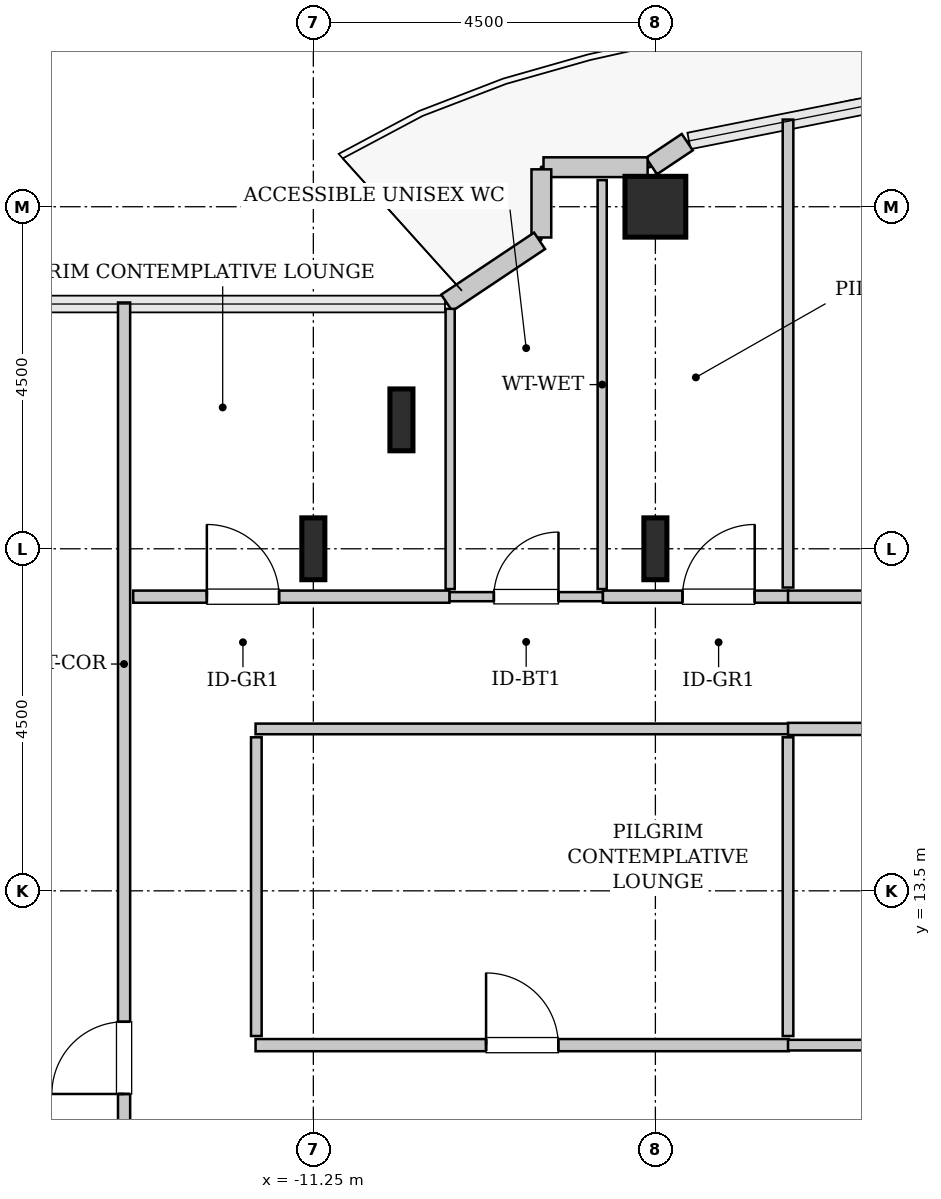
"""IFC4 building model, lengths in metres.
Left out: names, types, materials, properties, quantities, classifications, styles, units other than length and angle.
Written with IfcOpenShell. Run it as: python <this file> out.ifc"""

import sys

from ifc_helpers import new_model, si_unit, direction, frame, frame_2d, origin, origin_2d, place, context, subcontext, project, spatial, rectangle, hollow_rectangle, i_section, extrude, source, transform, mapped, element, fill, save


model = new_model("IFC4")
c1 = context("Model", 3, precision=1e-05, world=origin(), true_north=direction((0.0, 1.0)))
c2 = subcontext(c1, "Body", "Model", "MODEL_VIEW")
j1 = project(units=[si_unit("LENGTHUNIT", "METRE"), si_unit("PLANEANGLEUNIT", "RADIAN")], contexts=[c1])
p1 = place(None, origin())
s1 = spatial("IfcSite", under=j1, at=p1, CompositionType="ELEMENT")
p2 = place(p1, origin())
s2 = spatial("IfcBuilding", under=s1, at=p2, CompositionType="ELEMENT")
p3 = place(p2, frame((0.0, 0.0, 148.8)))
s3 = spatial("IfcBuildingStorey", under=s2, at=p3, CompositionType="ELEMENT", Elevation=148.8)
m1 = source(origin(), c2, "Body", "SweptSolid", [
    extrude(i_section(OverallWidth=0.303, OverallDepth=0.814, WebThickness=0.021, FlangeThickness=0.04, FilletRadius=0.03, at=origin_2d()), origin(), (0.0, 0.0, 1.0), 3.8),
])
for number, where, z_axis, x_axis in (
    (1, (-11.25, 18.0, 0.0), (0.0, 0.0, 1.0), (1.0, 0.0, 0.0)),
    (2, (-10.091, 19.696, 0.0), (0.0, 0.0, 1.0), (1.0, 0.0, 0.0)),
    (3, (-6.75, 18.0, 0.0), (0.0, 0.0, 1.0), (1.0, 0.0, 0.0)),
):
    element("IfcColumn", number, at=place(p3, frame(where, z_axis=z_axis, x_axis=x_axis)), inside=s3, PredefinedType="COLUMN", context=c2, shape_type="MappedRepresentation", body=[
        mapped(m1, transform((0.0, 0.0, 0.0), x_axis=(1.0, 0.0, 0.0), y_axis=(0.0, 1.0, 0.0), z_axis=(0.0, 0.0, 1.0), scale=1.0)),
    ])
m2 = source(origin(), c2, "Body", "SweptSolid", [
    extrude(hollow_rectangle(XDim=0.8, YDim=0.8, WallThickness=0.04, InnerFilletRadius=0.04, OuterFilletRadius=0.08, at=origin_2d()), origin(), (0.0, 0.0, 1.0), 3.8),
])
p4 = place(p3, frame((-6.75, 22.5, 0.0), z_axis=(0.0, 0.0, 1.0), x_axis=(1.0, 0.0, 0.0)))
e4 = element("IfcColumn", 4, at=p4, inside=s3, PredefinedType="COLUMN", context=c2, shape_type="MappedRepresentation", body=[
    mapped(m2, transform((0.0, 0.0, 0.0), x_axis=(1.0, 0.0, 0.0), y_axis=(0.0, 1.0, 0.0), z_axis=(0.0, 0.0, 1.0), scale=1.0)),
])
m3 = source(origin(), c2, "Body", "SweptSolid", [
    extrude(rectangle(XDim=0.565, YDim=0.26, at=frame_2d((0.283, 0.0))), origin(), (0.0, 0.0, 1.0), 3.55),
])
p5 = place(p3, frame((-6.331, 23.35, 0.0), z_axis=(0.0, 0.0, 1.0), x_axis=(-0.831651492666, -0.555297933317, 0.0)))
e5 = element("IfcWall", 5, at=p5, inside=s3, PredefinedType="SOLIDWALL", context=c2, shape_type="MappedRepresentation", body=[
    mapped(m3, transform((0.0, 0.0, 0.0), x_axis=(1.0, 0.0, 0.0), y_axis=(0.0, 1.0, 0.0), z_axis=(0.0, 0.0, 1.0), scale=1.0)),
])
m4 = source(origin(), c2, "Body", "SweptSolid", [
    extrude(rectangle(XDim=1.37, YDim=0.26, at=frame_2d((0.685, 0.0))), origin(), (0.0, 0.0, 1.0), 3.55),
])
p6 = place(p3, frame((-6.852, 23.02, 0.0), z_axis=(0.0, 0.0, 1.0), x_axis=(-1.0, 0.0, 0.0)))
e6 = element("IfcWall", 6, at=p6, inside=s3, PredefinedType="SOLIDWALL", context=c2, shape_type="MappedRepresentation", body=[
    mapped(m4, transform((0.0, 0.0, 0.0), x_axis=(1.0, 0.0, 0.0), y_axis=(0.0, 1.0, 0.0), z_axis=(0.0, 0.0, 1.0), scale=1.0)),
])
m5 = source(origin(), c2, "Body", "SweptSolid", [
    extrude(rectangle(XDim=0.897, YDim=0.26, at=frame_2d((0.448, 0.0))), origin(), (0.0, 0.0, 1.0), 3.55),
])
p7 = place(p3, frame((-8.25, 22.992, 0.0), z_axis=(0.0, 0.0, 1.0), x_axis=(0.0, -1.0, 0.0)))
e7 = element("IfcWall", 7, at=p7, inside=s3, PredefinedType="SOLIDWALL", context=c2, shape_type="MappedRepresentation", body=[
    mapped(m5, transform((0.0, 0.0, 0.0), x_axis=(1.0, 0.0, 0.0), y_axis=(0.0, 1.0, 0.0), z_axis=(0.0, 0.0, 1.0), scale=1.0)),
])
m6 = source(origin(), c2, "Body", "SweptSolid", [
    extrude(rectangle(XDim=1.469, YDim=0.26, at=frame_2d((0.734, 0.0))), origin(), (0.0, 0.0, 1.0), 3.55),
])
p8 = place(p3, frame((-8.273, 22.052, 0.0), z_axis=(0.0, 0.0, 1.0), x_axis=(-0.831461760506, -0.555581983884, 0.0)))
e8 = element("IfcWall", 8, at=p8, inside=s3, PredefinedType="SOLIDWALL", context=c2, shape_type="MappedRepresentation", body=[
    mapped(m6, transform((0.0, 0.0, 0.0), x_axis=(1.0, 0.0, 0.0), y_axis=(0.0, 1.0, 0.0), z_axis=(0.0, 0.0, 1.0), scale=1.0)),
])
m7 = source(origin(), c2, "Body", "SweptSolid", [
    extrude(rectangle(XDim=2.02, YDim=0.12, at=frame_2d((1.01, 0.0))), origin(), (0.0, 0.0, 1.0), 3.535),
])
p9 = place(p3, frame((-9.46, 17.37, 0.0), z_axis=(0.0, 0.0, 1.0), x_axis=(1.0, 0.0, 0.0)))
e9 = element("IfcWall", 9, at=p9, inside=s3, PredefinedType="PLUMBINGWALL", context=c2, shape_type="MappedRepresentation", body=[
    mapped(m7, transform((0.0, 0.0, 0.0), x_axis=(1.0, 0.0, 0.0), y_axis=(0.0, 1.0, 0.0), z_axis=(0.0, 0.0, 1.0), scale=1.0)),
])
p10 = place(p9, frame((0.585, 0.0, 0.0)))
e10 = element("IfcOpeningElement", 10, at=p10, cuts=e9, PredefinedType="OPENING", context=c2, shape_type="SweptSolid", body=[
    extrude(rectangle(XDim=0.85, YDim=2.1, at=frame_2d((0.425, 1.05))), frame((0.0, 0.07, 0.0), z_axis=(0.0, -1.0, 0.0), x_axis=(1.0, 0.0, 0.0)), (0.0, 0.0, 1.0), 0.14),
])
m8 = source(origin(), c2, "Body", "SweptSolid", [
    extrude(rectangle(XDim=5.38, YDim=0.12, at=frame_2d((2.69, 0.0))), origin(), (0.0, 0.0, 1.0), 3.535),
])
p11 = place(p3, frame((-7.45, 17.47, 0.0), z_axis=(0.0, 0.0, 1.0), x_axis=(0.0, 1.0, 0.0)))
e11 = element("IfcWall", 11, at=p11, inside=s3, PredefinedType="PLUMBINGWALL", context=c2, shape_type="MappedRepresentation", body=[
    mapped(m8, transform((0.0, 0.0, 0.0), x_axis=(1.0, 0.0, 0.0), y_axis=(0.0, 1.0, 0.0), z_axis=(0.0, 0.0, 1.0), scale=1.0)),
])
m9 = source(origin(), c2, "Body", "SweptSolid", [
    extrude(rectangle(XDim=3.687, YDim=0.12, at=frame_2d((1.843, 0.0))), origin(), (0.0, 0.0, 1.0), 3.535),
])
p12 = place(p3, frame((-9.45, 17.47, 0.0), z_axis=(0.0, 0.0, 1.0), x_axis=(0.0, 1.0, 0.0)))
e12 = element("IfcWall", 12, at=p12, inside=s3, PredefinedType="PLUMBINGWALL", context=c2, shape_type="MappedRepresentation", body=[
    mapped(m9, transform((0.0, 0.0, 0.0), x_axis=(1.0, 0.0, 0.0), y_axis=(0.0, 1.0, 0.0), z_axis=(0.0, 0.0, 1.0), scale=1.0)),
])
m10 = source(origin(), c2, "Body", "SweptSolid", [
    extrude(rectangle(XDim=16.045, YDim=0.16, at=frame_2d((8.022, 0.0))), origin(), (0.0, 0.0, 1.0), 3.535),
])
p13 = place(p3, frame((-13.74, 5.195, 0.0), z_axis=(0.0, 0.0, 1.0), x_axis=(0.0, 1.0, 0.0)))
e13 = element("IfcWall", 13, at=p13, inside=s3, PredefinedType="PARTITIONING", context=c2, shape_type="MappedRepresentation", body=[
    mapped(m10, transform((0.0, 0.0, 0.0), x_axis=(1.0, 0.0, 0.0), y_axis=(0.0, 1.0, 0.0), z_axis=(0.0, 0.0, 1.0), scale=1.0)),
])
p14 = place(p13, frame((5.633, 0.0, 0.0)))
e14 = element("IfcOpeningElement", 14, at=p14, cuts=e13, PredefinedType="OPENING", context=c2, shape_type="SweptSolid", body=[
    extrude(rectangle(XDim=0.95, YDim=2.1, at=frame_2d((0.475, 1.05))), frame((0.0, 0.09, 0.0), z_axis=(0.0, -1.0, 0.0), x_axis=(1.0, 0.0, 0.0)), (0.0, 0.0, 1.0), 0.18),
])
m11 = source(origin(), c2, "Body", "SweptSolid", [
    extrude(rectangle(XDim=7.015, YDim=0.16, at=frame_2d((3.507, 0.0))), origin(), (0.0, 0.0, 1.0), 3.535),
])
p15 = place(p3, frame((-12.01, 11.47, 0.0), z_axis=(0.0, 0.0, 1.0), x_axis=(1.0, 0.0, 0.0)))
e15 = element("IfcWall", 15, at=p15, inside=s3, PredefinedType="PARTITIONING", context=c2, shape_type="MappedRepresentation", body=[
    mapped(m11, transform((0.0, 0.0, 0.0), x_axis=(1.0, 0.0, 0.0), y_axis=(0.0, 1.0, 0.0), z_axis=(0.0, 0.0, 1.0), scale=1.0)),
])
p16 = place(p15, frame((3.032, 0.0, 0.0)))
e16 = element("IfcOpeningElement", 16, at=p16, cuts=e15, PredefinedType="OPENING", context=c2, shape_type="SweptSolid", body=[
    extrude(rectangle(XDim=0.95, YDim=2.1, at=frame_2d((0.475, 1.05))), frame((0.0, 0.09, 0.0), z_axis=(0.0, -1.0, 0.0), x_axis=(1.0, 0.0, 0.0)), (0.0, 0.0, 1.0), 0.18),
])
m12 = source(origin(), c2, "Body", "SweptSolid", [
    extrude(rectangle(XDim=7.015, YDim=0.14, at=frame_2d((3.507, 0.0))), origin(), (0.0, 0.0, 1.0), 3.535),
])
p17 = place(p3, frame((-12.01, 15.63, 0.0), z_axis=(0.0, 0.0, 1.0), x_axis=(1.0, 0.0, 0.0)))
e17 = element("IfcWall", 17, at=p17, inside=s3, PredefinedType="PARTITIONING", context=c2, shape_type="MappedRepresentation", body=[
    mapped(m12, transform((0.0, 0.0, 0.0), x_axis=(1.0, 0.0, 0.0), y_axis=(0.0, 1.0, 0.0), z_axis=(0.0, 0.0, 1.0), scale=1.0)),
])
m13 = source(origin(), c2, "Body", "SweptSolid", [
    extrude(rectangle(XDim=3.93, YDim=0.14, at=frame_2d((1.965, 0.0))), origin(), (0.0, 0.0, 1.0), 3.535),
])
for number, where, z_axis, x_axis in (
    (18, (-12.0, 11.59, 0.0), (0.0, 0.0, 1.0), (0.0, 1.0, 0.0)),
    (19, (-5.005, 11.59, 0.0), (0.0, 0.0, 1.0), (0.0, 1.0, 0.0)),
):
    element("IfcWall", number, at=place(p3, frame(where, z_axis=z_axis, x_axis=x_axis)), inside=s3, PredefinedType="PARTITIONING", context=c2, shape_type="MappedRepresentation", body=[
        mapped(m13, transform((0.0, 0.0, 0.0), x_axis=(1.0, 0.0, 0.0), y_axis=(0.0, 1.0, 0.0), z_axis=(0.0, 0.0, 1.0), scale=1.0)),
    ])
m14 = source(origin(), c2, "Body", "SweptSolid", [
    extrude(rectangle(XDim=2.445, YDim=0.16, at=frame_2d((1.222, 0.0))), origin(), (0.0, 0.0, 1.0), 3.535),
])
p18 = place(p3, frame((-7.44, 17.37, 0.0), z_axis=(0.0, 0.0, 1.0), x_axis=(1.0, 0.0, 0.0)))
e20 = element("IfcWall", 20, at=p18, inside=s3, PredefinedType="PARTITIONING", context=c2, shape_type="MappedRepresentation", body=[
    mapped(m14, transform((0.0, 0.0, 0.0), x_axis=(1.0, 0.0, 0.0), y_axis=(0.0, 1.0, 0.0), z_axis=(0.0, 0.0, 1.0), scale=1.0)),
])
p19 = place(p18, frame((1.047, 0.0, 0.0)))
e21 = element("IfcOpeningElement", 21, at=p19, cuts=e20, PredefinedType="OPENING", context=c2, shape_type="SweptSolid", body=[
    extrude(rectangle(XDim=0.95, YDim=2.1, at=frame_2d((0.475, 1.05))), frame((0.0, 0.09, 0.0), z_axis=(0.0, -1.0, 0.0), x_axis=(1.0, 0.0, 0.0)), (0.0, 0.0, 1.0), 0.18),
])
m15 = source(origin(), c2, "Body", "SweptSolid", [
    extrude(rectangle(XDim=6.157, YDim=0.14, at=frame_2d((3.078, 0.0))), origin(), (0.0, 0.0, 1.0), 3.535),
])
p20 = place(p3, frame((-5.005, 17.49, 0.0), z_axis=(0.0, 0.0, 1.0), x_axis=(0.0, 1.0, 0.0)))
e22 = element("IfcWall", 22, at=p20, inside=s3, PredefinedType="PARTITIONING", context=c2, shape_type="MappedRepresentation", body=[
    mapped(m15, transform((0.0, 0.0, 0.0), x_axis=(1.0, 0.0, 0.0), y_axis=(0.0, 1.0, 0.0), z_axis=(0.0, 0.0, 1.0), scale=1.0)),
])
m16 = source(origin(), c2, "Body", "SweptSolid", [
    extrude(rectangle(XDim=4.16, YDim=0.16, at=frame_2d((2.08, 0.0))), origin(), (0.0, 0.0, 1.0), 3.535),
])
p21 = place(p3, frame((-13.62, 17.37, 0.0), z_axis=(0.0, 0.0, 1.0), x_axis=(1.0, 0.0, 0.0)))
e23 = element("IfcWall", 23, at=p21, inside=s3, PredefinedType="PARTITIONING", context=c2, shape_type="MappedRepresentation", body=[
    mapped(m16, transform((0.0, 0.0, 0.0), x_axis=(1.0, 0.0, 0.0), y_axis=(0.0, 1.0, 0.0), z_axis=(0.0, 0.0, 1.0), scale=1.0)),
])
p22 = place(p21, frame((0.969, 0.0, 0.0)))
e24 = element("IfcOpeningElement", 24, at=p22, cuts=e23, PredefinedType="OPENING", context=c2, shape_type="SweptSolid", body=[
    extrude(rectangle(XDim=0.95, YDim=2.1, at=frame_2d((0.475, 1.05))), frame((0.0, 0.09, 0.0), z_axis=(0.0, -1.0, 0.0), x_axis=(1.0, 0.0, 0.0)), (0.0, 0.0, 1.0), 0.18),
])
m17 = source(origin(), c2, "Body", "SweptSolid", [
    extrude(rectangle(XDim=7.41, YDim=0.16, at=frame_2d((3.705, 0.0))), origin(), (0.0, 0.0, 1.0), 3.535),
])
p23 = place(p3, frame((-5.005, 17.37, 0.0), z_axis=(0.0, 0.0, 1.0), x_axis=(1.0, 0.0, 0.0)))
e25 = element("IfcWall", 25, at=p23, inside=s3, PredefinedType="PARTITIONING", context=c2, shape_type="MappedRepresentation", body=[
    mapped(m17, transform((0.0, 0.0, 0.0), x_axis=(1.0, 0.0, 0.0), y_axis=(0.0, 1.0, 0.0), z_axis=(0.0, 0.0, 1.0), scale=1.0)),
])
p24 = place(p23, frame((3.23, 0.0, 0.0)))
e26 = element("IfcOpeningElement", 26, at=p24, cuts=e25, PredefinedType="OPENING", context=c2, shape_type="SweptSolid", body=[
    extrude(rectangle(XDim=0.95, YDim=2.1, at=frame_2d((0.475, 1.05))), frame((0.0, 0.09, 0.0), z_axis=(0.0, -1.0, 0.0), x_axis=(1.0, 0.0, 0.0)), (0.0, 0.0, 1.0), 0.18),
])
p25 = place(p3, frame((-5.005, 15.63, 0.0), z_axis=(0.0, 0.0, 1.0), x_axis=(1.0, 0.0, 0.0)))
e27 = element("IfcWall", 27, at=p25, inside=s3, PredefinedType="PARTITIONING", context=c2, shape_type="MappedRepresentation", body=[
    mapped(m17, transform((0.0, 0.0, 0.0), x_axis=(1.0, 0.0, 0.0), y_axis=(0.0, 1.0, 0.0), z_axis=(0.0, 0.0, 1.0), scale=1.0)),
])
p26 = place(p25, frame((3.23, 0.0, 0.0)))
e28 = element("IfcOpeningElement", 28, at=p26, cuts=e27, PredefinedType="OPENING", context=c2, shape_type="SweptSolid", body=[
    extrude(rectangle(XDim=0.95, YDim=2.1, at=frame_2d((0.475, 1.05))), frame((0.0, 0.09, 0.0), z_axis=(0.0, -1.0, 0.0), x_axis=(1.0, 0.0, 0.0)), (0.0, 0.0, 1.0), 0.18),
])
m18 = source(origin(), c2, "Body", "SweptSolid", [
    extrude(rectangle(XDim=7.41, YDim=0.14, at=frame_2d((3.705, 0.0))), origin(), (0.0, 0.0, 1.0), 3.535),
])
p27 = place(p3, frame((-5.005, 11.47, 0.0), z_axis=(0.0, 0.0, 1.0), x_axis=(1.0, 0.0, 0.0)))
e29 = element("IfcWall", 29, at=p27, inside=s3, PredefinedType="PARTITIONING", context=c2, shape_type="MappedRepresentation", body=[
    mapped(m18, transform((0.0, 0.0, 0.0), x_axis=(1.0, 0.0, 0.0), y_axis=(0.0, 1.0, 0.0), z_axis=(0.0, 0.0, 1.0), scale=1.0)),
])
m19 = source(origin(), c2, "Body", "SweptSolid", [
    extrude(rectangle(XDim=0.85, YDim=2.1, at=frame_2d((0.425, 1.05))), frame((0.0, 0.025, 0.0), z_axis=(0.0, -1.0, 0.0), x_axis=(1.0, 0.0, 0.0)), (0.0, 0.0, 1.0), 0.05),
])
p28 = place(p10, origin())
e30 = element("IfcDoor", 30, at=p28, inside=s3, OperationType="SINGLE_SWING_RIGHT", PredefinedType="DOOR", context=c2, shape_type="MappedRepresentation", body=[
    mapped(m19, transform((0.0, 0.0, 0.0), x_axis=(1.0, 0.0, 0.0), y_axis=(0.0, 1.0, 0.0), z_axis=(0.0, 0.0, 1.0), scale=1.0)),
])
fill(e10, e30)
m20 = source(origin(), c2, "Body", "SweptSolid", [
    extrude(rectangle(XDim=0.95, YDim=2.1, at=frame_2d((0.475, 1.05))), frame((0.0, 0.025, 0.0), z_axis=(0.0, -1.0, 0.0), x_axis=(1.0, 0.0, 0.0)), (0.0, 0.0, 1.0), 0.05),
])
p29 = place(p14, origin())
e31 = element("IfcDoor", 31, at=p29, inside=s3, OperationType="SINGLE_SWING_LEFT", PredefinedType="DOOR", context=c2, shape_type="MappedRepresentation", body=[
    mapped(m20, transform((0.0, 0.0, 0.0), x_axis=(1.0, 0.0, 0.0), y_axis=(0.0, 1.0, 0.0), z_axis=(0.0, 0.0, 1.0), scale=1.0)),
])
fill(e14, e31)
p30 = place(p16, origin())
e32 = element("IfcDoor", 32, at=p30, inside=s3, OperationType="SINGLE_SWING_LEFT", PredefinedType="DOOR", context=c2, shape_type="MappedRepresentation", body=[
    mapped(m20, transform((0.0, 0.0, 0.0), x_axis=(1.0, 0.0, 0.0), y_axis=(0.0, 1.0, 0.0), z_axis=(0.0, 0.0, 1.0), scale=1.0)),
])
fill(e16, e32)
p31 = place(p19, origin())
e33 = element("IfcDoor", 33, at=p31, inside=s3, OperationType="SINGLE_SWING_RIGHT", PredefinedType="DOOR", context=c2, shape_type="MappedRepresentation", body=[
    mapped(m20, transform((0.0, 0.0, 0.0), x_axis=(1.0, 0.0, 0.0), y_axis=(0.0, 1.0, 0.0), z_axis=(0.0, 0.0, 1.0), scale=1.0)),
])
fill(e21, e33)
p32 = place(p22, origin())
e34 = element("IfcDoor", 34, at=p32, inside=s3, OperationType="SINGLE_SWING_LEFT", PredefinedType="DOOR", context=c2, shape_type="MappedRepresentation", body=[
    mapped(m20, transform((0.0, 0.0, 0.0), x_axis=(1.0, 0.0, 0.0), y_axis=(0.0, 1.0, 0.0), z_axis=(0.0, 0.0, 1.0), scale=1.0)),
])
fill(e24, e34)
save(model, sys.argv[1])
